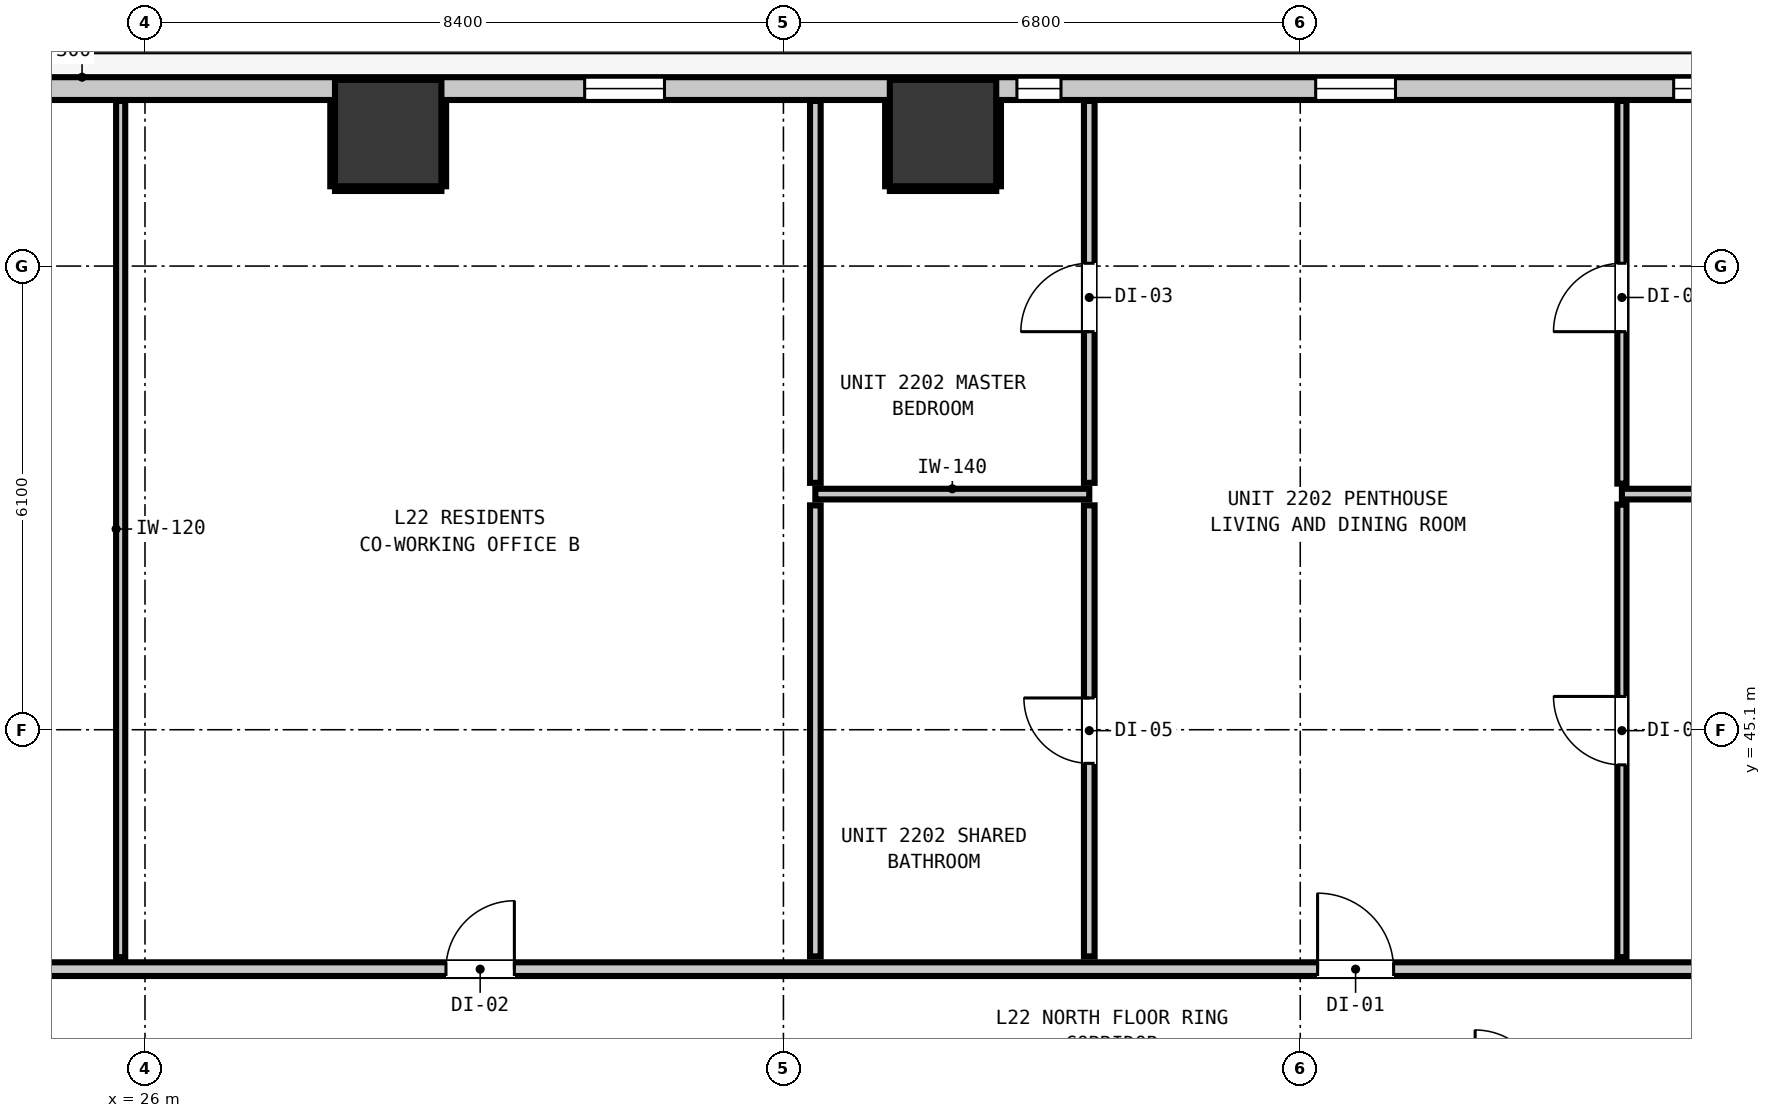
"""IFC4 building model, lengths in metres.
Left out: names, types, materials, properties, quantities, classifications, styles, units other than length and angle.
Written with IfcOpenShell. Run it as: python <this file> out.ifc"""

import sys

from ifc_helpers import new_model, si_unit, direction, frame, frame_2d, origin, origin_2d, place, context, subcontext, project, spatial, rectangle, extrude, element, fill, save


model = new_model("IFC4")
c1 = context("Model", 3, precision=1e-05, world=origin(), true_north=direction((0.0, 1.0)))
c2 = subcontext(c1, "Body", "Model", "MODEL_VIEW")
j1 = project(units=[si_unit("LENGTHUNIT", "METRE"), si_unit("PLANEANGLEUNIT", "RADIAN")], contexts=[c1])
p1 = place(None, origin())
s1 = spatial("IfcSite", under=j1, at=p1, CompositionType="ELEMENT")
p2 = place(p1, origin())
s2 = spatial("IfcBuilding", under=s1, at=p2, CompositionType="ELEMENT")
p3 = place(p2, frame((0.0, 0.0, 78.44)))
s3 = spatial("IfcBuildingStorey", under=s2, at=p3, CompositionType="ELEMENT", Elevation=78.44)
for number, where, z_axis, x_axis in (
    (1, (29.2, 52.95, 0.0), (0.0, 0.0, 1.0), (1.0, 0.0, 0.0)),
    (2, (36.5, 52.95, 0.0), (0.0, 0.0, 1.0), (1.0, 0.0, 0.0)),
):
    element("IfcColumn", number, at=place(p3, frame(where, z_axis=z_axis, x_axis=x_axis)), inside=s3, PredefinedType="COLUMN", context=c2, shape_type="SweptSolid", body=[
        extrude(rectangle(XDim=1.4, YDim=1.4, at=origin_2d()), origin(), (0.0, 0.0, 1.0), 2.9),
    ])
p4 = place(p3, frame((10.365, 53.535, 0.0), z_axis=(0.0, 0.0, 1.0), x_axis=(1.0, 0.0, 0.0)))
e3 = element("IfcWall", 3, at=p4, inside=s3, PredefinedType="STANDARD", context=c2, shape_type="SweptSolid", body=[
    extrude(rectangle(XDim=37.47, YDim=0.3, at=frame_2d((18.735, 0.0))), origin(), (0.0, 0.0, 1.0), 2.9),
])
p5 = place(p4, frame((4.403, 0.0, 0.0)))
e4 = element("IfcOpeningElement", 4, at=p5, cuts=e3, PredefinedType="OPENING", context=c2, shape_type="SweptSolid", body=[
    extrude(rectangle(XDim=1.0, YDim=2.15, at=frame_2d((0.5, 1.075))), frame((0.0, 0.16, 0.0), z_axis=(0.0, -1.0, 0.0), x_axis=(1.0, 0.0, 0.0)), (0.0, 0.0, 1.0), 0.32),
])
p6 = place(p4, frame((7.144, 0.0, 0.85)))
e5 = element("IfcOpeningElement", 5, at=p6, cuts=e3, PredefinedType="OPENING", context=c2, shape_type="SweptSolid", body=[
    extrude(rectangle(XDim=1.05, YDim=1.65, at=frame_2d((0.525, 0.825))), frame((0.0, 0.16, 0.0), z_axis=(0.0, -1.0, 0.0), x_axis=(1.0, 0.0, 0.0)), (0.0, 0.0, 1.0), 0.32),
])
p7 = place(p4, frame((21.42, 0.0, 0.85)))
e6 = element("IfcOpeningElement", 6, at=p7, cuts=e3, PredefinedType="OPENING", context=c2, shape_type="SweptSolid", body=[
    extrude(rectangle(XDim=1.05, YDim=1.65, at=frame_2d((0.525, 0.825))), frame((0.0, 0.16, 0.0), z_axis=(0.0, -1.0, 0.0), x_axis=(1.0, 0.0, 0.0)), (0.0, 0.0, 1.0), 0.32),
])
p8 = place(p4, frame((31.038, 0.0, 0.85)))
e7 = element("IfcOpeningElement", 7, at=p8, cuts=e3, PredefinedType="OPENING", context=c2, shape_type="SweptSolid", body=[
    extrude(rectangle(XDim=1.05, YDim=1.65, at=frame_2d((0.525, 0.825))), frame((0.0, 0.16, 0.0), z_axis=(0.0, -1.0, 0.0), x_axis=(1.0, 0.0, 0.0)), (0.0, 0.0, 1.0), 0.32),
])
p9 = place(p4, frame((27.107, 0.0, 0.85)))
e8 = element("IfcOpeningElement", 8, at=p9, cuts=e3, PredefinedType="OPENING", context=c2, shape_type="SweptSolid", body=[
    extrude(rectangle(XDim=0.58, YDim=1.5, at=frame_2d((0.29, 0.75))), frame((0.0, 0.16, 0.0), z_axis=(0.0, -1.0, 0.0), x_axis=(1.0, 0.0, 0.0)), (0.0, 0.0, 1.0), 0.32),
])
p10 = place(p4, frame((35.748, 0.0, 0.85)))
e9 = element("IfcOpeningElement", 9, at=p10, cuts=e3, PredefinedType="OPENING", context=c2, shape_type="SweptSolid", body=[
    extrude(rectangle(XDim=1.05, YDim=1.65, at=frame_2d((0.525, 0.825))), frame((0.0, 0.16, 0.0), z_axis=(0.0, -1.0, 0.0), x_axis=(1.0, 0.0, 0.0)), (0.0, 0.0, 1.0), 0.32),
])
p11 = place(p3, frame((8.027, 41.95, 0.0), z_axis=(0.0, 0.0, 1.0), x_axis=(1.0, 0.0, 0.0)))
e10 = element("IfcWall", 10, at=p11, inside=s3, PredefinedType="PARTITIONING", context=c2, shape_type="SweptSolid", body=[
    extrude(rectangle(XDim=42.146, YDim=0.18, at=frame_2d((21.073, 0.0))), origin(), (0.0, 0.0, 1.0), 2.9),
])
p12 = place(p11, frame((9.448, 0.0, 0.0)))
e11 = element("IfcOpeningElement", 11, at=p12, cuts=e10, PredefinedType="OPENING", context=c2, shape_type="SweptSolid", body=[
    extrude(rectangle(XDim=0.9, YDim=2.1, at=frame_2d((0.45, 1.05))), frame((0.0, 0.1, 0.0), z_axis=(0.0, -1.0, 0.0), x_axis=(1.0, 0.0, 0.0)), (0.0, 0.0, 1.0), 0.2),
])
p13 = place(p11, frame((21.933, 0.0, 0.0)))
e12 = element("IfcOpeningElement", 12, at=p13, cuts=e10, PredefinedType="OPENING", context=c2, shape_type="SweptSolid", body=[
    extrude(rectangle(XDim=0.9, YDim=2.1, at=frame_2d((0.45, 1.05))), frame((0.0, 0.1, 0.0), z_axis=(0.0, -1.0, 0.0), x_axis=(1.0, 0.0, 0.0)), (0.0, 0.0, 1.0), 0.2),
])
p14 = place(p11, frame((33.401, 0.0, 0.0)))
e13 = element("IfcOpeningElement", 13, at=p14, cuts=e10, PredefinedType="OPENING", context=c2, shape_type="SweptSolid", body=[
    extrude(rectangle(XDim=1.0, YDim=2.15, at=frame_2d((0.5, 1.075))), frame((0.0, 0.1, 0.0), z_axis=(0.0, -1.0, 0.0), x_axis=(1.0, 0.0, 0.0)), (0.0, 0.0, 1.0), 0.2),
])
p15 = place(p3, frame((34.82, 48.2, 0.0), z_axis=(0.0, 0.0, 1.0), x_axis=(1.0, 0.0, 0.0)))
e14 = element("IfcWall", 14, at=p15, inside=s3, PredefinedType="PARTITIONING", context=c2, shape_type="SweptSolid", body=[
    extrude(rectangle(XDim=3.604, YDim=0.14, at=frame_2d((1.802, 0.0))), origin(), (0.0, 0.0, 1.0), 2.9),
])
p16 = place(p3, frame((45.432, 48.2, 0.0), z_axis=(0.0, 0.0, 1.0), x_axis=(1.0, 0.0, 0.0)))
e15 = element("IfcWall", 15, at=p16, inside=s3, PredefinedType="PARTITIONING", context=c2, shape_type="SweptSolid", body=[
    extrude(rectangle(XDim=4.741, YDim=0.14, at=frame_2d((2.371, 0.0))), origin(), (0.0, 0.0, 1.0), 2.9),
])
p17 = place(p3, frame((34.82, 42.118, 0.0), z_axis=(0.0, 0.0, 1.0), x_axis=(0.0, 1.0, 0.0)))
e16 = element("IfcWall", 16, at=p17, inside=s3, PredefinedType="PARTITIONING", context=c2, shape_type="SweptSolid", body=[
    extrude(rectangle(XDim=5.934, YDim=0.14, at=frame_2d((2.967, 0.0))), origin(), (0.0, 0.0, 1.0), 2.9),
])
p18 = place(p3, frame((34.82, 48.348, 0.0), z_axis=(0.0, 0.0, 1.0), x_axis=(0.0, 1.0, 0.0)))
e17 = element("IfcWall", 17, at=p18, inside=s3, PredefinedType="PARTITIONING", context=c2, shape_type="SweptSolid", body=[
    extrude(rectangle(XDim=5.025, YDim=0.14, at=frame_2d((2.513, 0.0))), origin(), (0.0, 0.0, 1.0), 2.9),
])
p19 = place(p3, frame((38.424, 42.118, 0.0), z_axis=(0.0, 0.0, 1.0), x_axis=(0.0, 1.0, 0.0)))
e18 = element("IfcWall", 18, at=p19, inside=s3, PredefinedType="PARTITIONING", context=c2, shape_type="SweptSolid", body=[
    extrude(rectangle(XDim=5.934, YDim=0.14, at=frame_2d((2.967, 0.0))), origin(), (0.0, 0.0, 1.0), 2.9),
])
p20 = place(p19, frame((2.54, 0.0, 0.0)))
e19 = element("IfcOpeningElement", 19, at=p20, cuts=e18, PredefinedType="OPENING", context=c2, shape_type="SweptSolid", body=[
    extrude(rectangle(XDim=0.86, YDim=2.02, at=frame_2d((0.43, 1.01))), frame((0.0, 0.08, 0.0), z_axis=(0.0, -1.0, 0.0), x_axis=(1.0, 0.0, 0.0)), (0.0, 0.0, 1.0), 0.16),
])
p21 = place(p3, frame((38.424, 48.348, 0.0), z_axis=(0.0, 0.0, 1.0), x_axis=(0.0, 1.0, 0.0)))
e20 = element("IfcWall", 20, at=p21, inside=s3, PredefinedType="PARTITIONING", context=c2, shape_type="SweptSolid", body=[
    extrude(rectangle(XDim=5.025, YDim=0.14, at=frame_2d((2.513, 0.0))), origin(), (0.0, 0.0, 1.0), 2.9),
])
p22 = place(p21, frame((1.989, 0.0, 0.0)))
e21 = element("IfcOpeningElement", 21, at=p22, cuts=e20, PredefinedType="OPENING", context=c2, shape_type="SweptSolid", body=[
    extrude(rectangle(XDim=0.9, YDim=2.1, at=frame_2d((0.45, 1.05))), frame((0.0, 0.08, 0.0), z_axis=(0.0, -1.0, 0.0), x_axis=(1.0, 0.0, 0.0)), (0.0, 0.0, 1.0), 0.16),
])
p23 = place(p3, frame((25.68, 42.108, 0.0), z_axis=(0.0, 0.0, 1.0), x_axis=(0.0, 1.0, 0.0)))
e22 = element("IfcWall", 22, at=p23, inside=s3, PredefinedType="PARTITIONING", context=c2, shape_type="SweptSolid", body=[
    extrude(rectangle(XDim=11.265, YDim=0.12, at=frame_2d((5.633, 0.0))), origin(), (0.0, 0.0, 1.0), 2.9),
])
p24 = place(p3, frame((45.432, 42.108, 0.0), z_axis=(0.0, 0.0, 1.0), x_axis=(0.0, 1.0, 0.0)))
e23 = element("IfcWall", 23, at=p24, inside=s3, PredefinedType="PARTITIONING", context=c2, shape_type="SweptSolid", body=[
    extrude(rectangle(XDim=5.954, YDim=0.12, at=frame_2d((2.977, 0.0))), origin(), (0.0, 0.0, 1.0), 2.9),
])
p25 = place(p24, frame((2.53, 0.0, 0.0)))
e24 = element("IfcOpeningElement", 24, at=p25, cuts=e23, PredefinedType="OPENING", context=c2, shape_type="SweptSolid", body=[
    extrude(rectangle(XDim=0.9, YDim=2.1, at=frame_2d((0.45, 1.05))), frame((0.0, 0.07, 0.0), z_axis=(0.0, -1.0, 0.0), x_axis=(1.0, 0.0, 0.0)), (0.0, 0.0, 1.0), 0.14),
])
p26 = place(p3, frame((45.432, 48.338, 0.0), z_axis=(0.0, 0.0, 1.0), x_axis=(0.0, 1.0, 0.0)))
e25 = element("IfcWall", 25, at=p26, inside=s3, PredefinedType="PARTITIONING", context=c2, shape_type="SweptSolid", body=[
    extrude(rectangle(XDim=5.035, YDim=0.12, at=frame_2d((2.518, 0.0))), origin(), (0.0, 0.0, 1.0), 2.9),
])
p27 = place(p26, frame((1.999, 0.0, 0.0)))
e26 = element("IfcOpeningElement", 26, at=p27, cuts=e25, PredefinedType="OPENING", context=c2, shape_type="SweptSolid", body=[
    extrude(rectangle(XDim=0.9, YDim=2.1, at=frame_2d((0.45, 1.05))), frame((0.0, 0.07, 0.0), z_axis=(0.0, -1.0, 0.0), x_axis=(1.0, 0.0, 0.0)), (0.0, 0.0, 1.0), 0.14),
])
p28 = place(p3, frame((28.5, 52.218, 0.0), z_axis=(0.0, 0.0, 1.0), x_axis=(1.0, 0.0, 0.0)))
e27 = element("IfcWall", 27, at=p28, inside=s3, PredefinedType="PARTITIONING", context=c2, shape_type="SweptSolid", body=[
    extrude(rectangle(XDim=1.4, YDim=0.06, at=frame_2d((0.7, 0.0))), origin(), (0.0, 0.0, 1.0), 1.45),
])
for number, where, z_axis, x_axis in (
    (28, (28.468, 52.25, 0.0), (0.0, 0.0, 1.0), (0.0, 1.0, 0.0)),
    (29, (29.932, 52.25, 0.0), (0.0, 0.0, 1.0), (0.0, 1.0, 0.0)),
):
    element("IfcWall", number, at=place(p3, frame(where, z_axis=z_axis, x_axis=x_axis)), inside=s3, PredefinedType="PARTITIONING", context=c2, shape_type="SweptSolid", body=[
        extrude(rectangle(XDim=1.12, YDim=0.06, at=frame_2d((0.56, 0.0))), origin(), (0.0, 0.0, 1.0), 1.45),
    ])
p29 = place(p3, frame((35.8, 52.218, 0.0), z_axis=(0.0, 0.0, 1.0), x_axis=(1.0, 0.0, 0.0)))
e30 = element("IfcWall", 30, at=p29, inside=s3, PredefinedType="PARTITIONING", context=c2, shape_type="SweptSolid", body=[
    extrude(rectangle(XDim=1.4, YDim=0.06, at=frame_2d((0.7, 0.0))), origin(), (0.0, 0.0, 1.0), 1.45),
])
for number, where, z_axis, x_axis in (
    (31, (35.768, 52.25, 0.0), (0.0, 0.0, 1.0), (0.0, 1.0, 0.0)),
    (32, (37.232, 52.25, 0.0), (0.0, 0.0, 1.0), (0.0, 1.0, 0.0)),
):
    element("IfcWall", number, at=place(p3, frame(where, z_axis=z_axis, x_axis=x_axis)), inside=s3, PredefinedType="PARTITIONING", context=c2, shape_type="SweptSolid", body=[
        extrude(rectangle(XDim=1.12, YDim=0.06, at=frame_2d((0.56, 0.0))), origin(), (0.0, 0.0, 1.0), 1.45),
    ])
p30 = place(p7, origin())
e33 = element("IfcWindow", 33, at=p30, inside=s3, PartitioningType="SINGLE_PANEL", PredefinedType="WINDOW", context=c2, shape_type="SweptSolid", body=[
    extrude(rectangle(XDim=1.05, YDim=1.65, at=frame_2d((0.525, 0.825))), frame((0.0, 0.03, 0.0), z_axis=(0.0, -1.0, 0.0), x_axis=(1.0, 0.0, 0.0)), (0.0, 0.0, 1.0), 0.06),
])
fill(e6, e33)
p31 = place(p8, origin())
e34 = element("IfcWindow", 34, at=p31, inside=s3, PartitioningType="SINGLE_PANEL", PredefinedType="WINDOW", context=c2, shape_type="SweptSolid", body=[
    extrude(rectangle(XDim=1.05, YDim=1.65, at=frame_2d((0.525, 0.825))), frame((0.0, 0.03, 0.0), z_axis=(0.0, -1.0, 0.0), x_axis=(1.0, 0.0, 0.0)), (0.0, 0.0, 1.0), 0.06),
])
fill(e7, e34)
p32 = place(p9, origin())
e35 = element("IfcWindow", 35, at=p32, inside=s3, PartitioningType="SINGLE_PANEL", PredefinedType="WINDOW", context=c2, shape_type="SweptSolid", body=[
    extrude(rectangle(XDim=0.58, YDim=1.5, at=frame_2d((0.29, 0.75))), frame((0.0, 0.03, 0.0), z_axis=(0.0, -1.0, 0.0), x_axis=(1.0, 0.0, 0.0)), (0.0, 0.0, 1.0), 0.06),
])
fill(e8, e35)
p33 = place(p10, origin())
e36 = element("IfcWindow", 36, at=p33, inside=s3, PartitioningType="SINGLE_PANEL", PredefinedType="WINDOW", context=c2, shape_type="SweptSolid", body=[
    extrude(rectangle(XDim=1.05, YDim=1.65, at=frame_2d((0.525, 0.825))), frame((0.0, 0.03, 0.0), z_axis=(0.0, -1.0, 0.0), x_axis=(1.0, 0.0, 0.0)), (0.0, 0.0, 1.0), 0.06),
])
fill(e9, e36)
p34 = place(p13, origin())
e37 = element("IfcDoor", 37, at=p34, inside=s3, OperationType="SINGLE_SWING_RIGHT", PredefinedType="DOOR", context=c2, shape_type="SweptSolid", body=[
    extrude(rectangle(XDim=0.9, YDim=2.1, at=frame_2d((0.45, 1.05))), frame((0.0, 0.025, 0.0), z_axis=(0.0, -1.0, 0.0), x_axis=(1.0, 0.0, 0.0)), (0.0, 0.0, 1.0), 0.05),
])
fill(e12, e37)
p35 = place(p14, origin())
e38 = element("IfcDoor", 38, at=p35, inside=s3, OperationType="SINGLE_SWING_LEFT", PredefinedType="DOOR", context=c2, shape_type="SweptSolid", body=[
    extrude(rectangle(XDim=1.0, YDim=2.15, at=frame_2d((0.5, 1.075))), frame((0.0, 0.025, 0.0), z_axis=(0.0, -1.0, 0.0), x_axis=(1.0, 0.0, 0.0)), (0.0, 0.0, 1.0), 0.05),
])
fill(e13, e38)
p36 = place(p20, origin())
e39 = element("IfcDoor", 39, at=p36, inside=s3, OperationType="SINGLE_SWING_RIGHT", PredefinedType="DOOR", context=c2, shape_type="SweptSolid", body=[
    extrude(rectangle(XDim=0.86, YDim=2.02, at=frame_2d((0.43, 1.01))), frame((0.0, 0.025, 0.0), z_axis=(0.0, -1.0, 0.0), x_axis=(1.0, 0.0, 0.0)), (0.0, 0.0, 1.0), 0.05),
])
fill(e19, e39)
p37 = place(p22, origin())
e40 = element("IfcDoor", 40, at=p37, inside=s3, OperationType="SINGLE_SWING_LEFT", PredefinedType="DOOR", context=c2, shape_type="SweptSolid", body=[
    extrude(rectangle(XDim=0.9, YDim=2.1, at=frame_2d((0.45, 1.05))), frame((0.0, 0.025, 0.0), z_axis=(0.0, -1.0, 0.0), x_axis=(1.0, 0.0, 0.0)), (0.0, 0.0, 1.0), 0.05),
])
fill(e21, e40)
p38 = place(p25, origin())
e41 = element("IfcDoor", 41, at=p38, inside=s3, OperationType="SINGLE_SWING_RIGHT", PredefinedType="DOOR", context=c2, shape_type="SweptSolid", body=[
    extrude(rectangle(XDim=0.9, YDim=2.1, at=frame_2d((0.45, 1.05))), frame((0.0, 0.025, 0.0), z_axis=(0.0, -1.0, 0.0), x_axis=(1.0, 0.0, 0.0)), (0.0, 0.0, 1.0), 0.05),
])
fill(e24, e41)
p39 = place(p27, origin())
e42 = element("IfcDoor", 42, at=p39, inside=s3, OperationType="SINGLE_SWING_LEFT", PredefinedType="DOOR", context=c2, shape_type="SweptSolid", body=[
    extrude(rectangle(XDim=0.9, YDim=2.1, at=frame_2d((0.45, 1.05))), frame((0.0, 0.025, 0.0), z_axis=(0.0, -1.0, 0.0), x_axis=(1.0, 0.0, 0.0)), (0.0, 0.0, 1.0), 0.05),
])
fill(e26, e42)
save(model, sys.argv[1])
